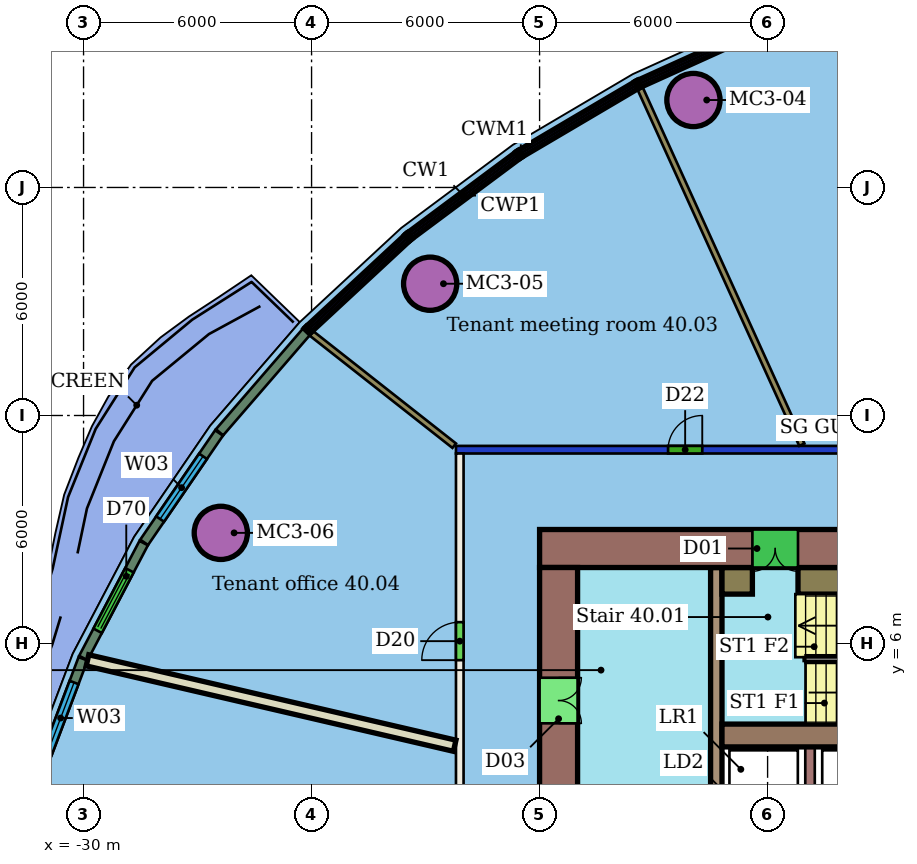
"""IFC4 building model, lengths in metres.
Left out: names, types, materials, properties, quantities, classifications, styles, units other than length and angle.
Written with IfcOpenShell. Run it as: python <this file> out.ifc"""

import sys

from ifc_helpers import new_model, si_unit, direction, frame, frame_2d, origin, origin_2d, place, context, subcontext, project, spatial, rectangle, hollow_circle, extrude, element, fill, save


model = new_model("IFC4")
c1 = context("Model", 3, precision=1e-05, world=origin(), true_north=direction((0.0, 1.0)))
c2 = subcontext(c1, "Body", "Model", "MODEL_VIEW")
j1 = project(units=[si_unit("LENGTHUNIT", "METRE"), si_unit("PLANEANGLEUNIT", "RADIAN")], contexts=[c1])
p1 = place(None, origin())
s1 = spatial("IfcSite", under=j1, at=p1, CompositionType="ELEMENT")
p2 = place(p1, origin())
s2 = spatial("IfcBuilding", under=s1, at=p2, CompositionType="ELEMENT")
p3 = place(p2, frame((0.0, 0.0, 168.6)))
s3 = spatial("IfcBuildingStorey", under=s2, at=p3, CompositionType="ELEMENT", Elevation=168.6)
for number, where, z_axis, x_axis in (
    (1, (-13.952, 20.301, 0.0), (0.0, 0.0, 1.0), (1.0, 0.0, 0.0)),
    (2, (-20.879, 15.467, 0.0), (0.0, 0.0, 1.0), (1.0, 0.0, 0.0)),
    (3, (-26.388, 8.912, 0.0), (0.0, 0.0, 1.0), (1.0, 0.0, 0.0)),
):
    element("IfcColumn", number, at=place(p3, frame(where, z_axis=z_axis, x_axis=x_axis)), inside=s3, PredefinedType="COLUMN", context=c2, shape_type="SweptSolid", body=[
        extrude(hollow_circle(Radius=0.7, WallThickness=0.05, at=origin_2d()), origin(), (0.0, 0.0, 1.0), 3.45),
    ])
p4 = place(p3, frame((-20.1, -11.0, 0.0), z_axis=(0.0, 0.0, 1.0), x_axis=(0.0, 1.0, 0.0)))
e4 = element("IfcWall", 4, at=p4, inside=s3, PredefinedType="PARTITIONING", context=c2, shape_type="SweptSolid", body=[
    extrude(rectangle(XDim=22.0, YDim=0.2, at=frame_2d((11.0, 0.0))), origin(), (0.0, 0.0, 1.0), 3.45),
])
p5 = place(p4, frame((16.562, 0.0, 0.0)))
e5 = element("IfcOpeningElement", 5, at=p5, cuts=e4, PredefinedType="OPENING", context=c2, shape_type="SweptSolid", body=[
    extrude(rectangle(XDim=1.0, YDim=2.1, at=frame_2d((0.5, 1.05))), frame((0.0, 0.11, 0.0), z_axis=(0.0, -1.0, 0.0), x_axis=(1.0, 0.0, 0.0)), (0.0, 0.0, 1.0), 0.22),
])
p6 = place(p4, frame((11.71, 0.0, 0.0)))
e6 = element("IfcOpeningElement", 6, at=p6, cuts=e4, PredefinedType="OPENING", context=c2, shape_type="SweptSolid", body=[
    extrude(rectangle(XDim=1.1, YDim=2.1, at=frame_2d((0.55, 1.05))), frame((0.0, 0.11, 0.0), z_axis=(0.0, -1.0, 0.0), x_axis=(1.0, 0.0, 0.0)), (0.0, 0.0, 1.0), 0.22),
])
p7 = place(p4, frame((6.269, 0.0, 0.0)))
e7 = element("IfcOpeningElement", 7, at=p7, cuts=e4, PredefinedType="OPENING", context=c2, shape_type="SweptSolid", body=[
    extrude(rectangle(XDim=1.2, YDim=2.1, at=frame_2d((0.6, 1.05))), frame((0.0, 0.11, 0.0), z_axis=(0.0, -1.0, 0.0), x_axis=(1.0, 0.0, 0.0)), (0.0, 0.0, 1.0), 0.22),
])
p8 = place(p3, frame((-20.2, 11.1, 0.0), z_axis=(0.0, 0.0, 1.0), x_axis=(1.0, 0.0, 0.0)))
e8 = element("IfcWall", 8, at=p8, inside=s3, PredefinedType="PARTITIONING", context=c2, shape_type="SweptSolid", body=[
    extrude(rectangle(XDim=28.4, YDim=0.2, at=frame_2d((14.2, 0.0))), origin(), (0.0, 0.0, 1.0), 3.05),
])
p9 = place(p8, frame((23.115, 0.0, 0.0)))
e9 = element("IfcOpeningElement", 9, at=p9, cuts=e8, PredefinedType="OPENING", context=c2, shape_type="SweptSolid", body=[
    extrude(rectangle(XDim=1.0, YDim=2.1, at=frame_2d((0.5, 1.05))), frame((0.0, 0.11, 0.0), z_axis=(0.0, -1.0, 0.0), x_axis=(1.0, 0.0, 0.0)), (0.0, 0.0, 1.0), 0.22),
])
p10 = place(p8, frame((16.0, 0.0, 0.0)))
e10 = element("IfcOpeningElement", 10, at=p10, cuts=e8, PredefinedType="OPENING", context=c2, shape_type="SweptSolid", body=[
    extrude(rectangle(XDim=1.8, YDim=2.1, at=frame_2d((0.9, 1.05))), frame((0.0, 0.11, 0.0), z_axis=(0.0, -1.0, 0.0), x_axis=(1.0, 0.0, 0.0)), (0.0, 0.0, 1.0), 0.22),
])
p11 = place(p8, frame((5.581, 0.0, 0.0)))
e11 = element("IfcOpeningElement", 11, at=p11, cuts=e8, PredefinedType="OPENING", context=c2, shape_type="SweptSolid", body=[
    extrude(rectangle(XDim=0.9, YDim=2.1, at=frame_2d((0.45, 1.05))), frame((0.0, 0.11, 0.0), z_axis=(0.0, -1.0, 0.0), x_axis=(1.0, 0.0, 0.0)), (0.0, 0.0, 1.0), 0.22),
])
p12 = place(p3, frame((-15.354, 20.604, 0.0), z_axis=(0.0, 0.0, 1.0), x_axis=(0.413381174211, -0.910558073276, 0.0)))
e12 = element("IfcWall", 12, at=p12, inside=s3, PredefinedType="PARTITIONING", context=c2, shape_type="SweptSolid", body=[
    extrude(rectangle(XDim=10.293, YDim=0.15, at=frame_2d((5.147, 0.0))), origin(), (0.0, 0.0, 1.0), 3.45),
])
p13 = place(p3, frame((-24.005, 14.162, 0.0), z_axis=(0.0, 0.0, 1.0), x_axis=(0.786002862243, -0.6182228567, 0.0)))
e13 = element("IfcWall", 13, at=p13, inside=s3, PredefinedType="PARTITIONING", context=c2, shape_type="SweptSolid", body=[
    extrude(rectangle(XDim=4.781, YDim=0.15, at=frame_2d((2.391, 0.0))), origin(), (0.0, 0.0, 1.0), 3.45),
])
p14 = place(p3, frame((-29.896, 5.558, 0.0), z_axis=(0.0, 0.0, 1.0), x_axis=(0.974001081483, -0.226543358476, 0.0)))
e14 = element("IfcWall", 14, at=p14, inside=s3, PredefinedType="PARTITIONING", context=c2, shape_type="SweptSolid", body=[
    extrude(rectangle(XDim=9.92, YDim=0.3, at=frame_2d((4.96, 0.0))), origin(), (0.0, 0.0, 1.0), 3.45),
])
p15 = place(p3, frame((-24.131, 14.207, 0.0), z_axis=(0.0, 0.0, 1.0), x_axis=(-0.654160555631, -0.756355714897, 0.0)))
e15 = element("IfcWall", 15, at=p15, inside=s3, PredefinedType="SOLIDWALL", context=c2, shape_type="SweptSolid", body=[
    extrude(rectangle(XDim=3.502, YDim=0.25, at=frame_2d((1.751, 0.0))), origin(), (0.0, 0.0, 1.0), 3.1),
])
p16 = place(p3, frame((-26.435, 11.54, 0.0), z_axis=(0.0, 0.0, 1.0), x_axis=(-0.564914738845, -0.825149282152, 0.0)))
e16 = element("IfcWall", 16, at=p16, inside=s3, PredefinedType="SOLIDWALL", context=c2, shape_type="SweptSolid", body=[
    extrude(rectangle(XDim=3.488, YDim=0.25, at=frame_2d((1.744, 0.0))), origin(), (0.0, 0.0, 1.0), 3.1),
])
p17 = place(p16, frame((0.744, 0.0, 0.9)))
e17 = element("IfcOpeningElement", 17, at=p17, cuts=e16, PredefinedType="OPENING", context=c2, shape_type="SweptSolid", body=[
    extrude(rectangle(XDim=2.0, YDim=2.1, at=frame_2d((1.0, 1.05))), frame((0.0, 0.135, 0.0), z_axis=(0.0, -1.0, 0.0), x_axis=(1.0, 0.0, 0.0)), (0.0, 0.0, 1.0), 0.27),
])
p18 = place(p3, frame((-28.417, 8.643, 0.0), z_axis=(0.0, 0.0, 1.0), x_axis=(-0.464826893602, -0.885401580631, 0.0)))
e18 = element("IfcWall", 18, at=p18, inside=s3, PredefinedType="SOLIDWALL", context=c2, shape_type="SweptSolid", body=[
    extrude(rectangle(XDim=3.415, YDim=0.25, at=frame_2d((1.708, 0.0))), origin(), (0.0, 0.0, 1.0), 3.1),
])
p19 = place(p18, frame((0.807, 0.0, 0.0)))
e19 = element("IfcOpeningElement", 19, at=p19, cuts=e18, PredefinedType="OPENING", context=c2, shape_type="SweptSolid", body=[
    extrude(rectangle(XDim=1.8, YDim=2.4, at=frame_2d((0.9, 1.2))), frame((0.0, 0.135, 0.0), z_axis=(0.0, -1.0, 0.0), x_axis=(1.0, 0.0, 0.0)), (0.0, 0.0, 1.0), 0.27),
])
p20 = place(p3, frame((-30.014, 5.598, 0.0), z_axis=(0.0, 0.0, 1.0), x_axis=(-0.353443321973, -0.935455941321, 0.0)))
e20 = element("IfcWall", 20, at=p20, inside=s3, PredefinedType="SOLIDWALL", context=c2, shape_type="SweptSolid", body=[
    extrude(rectangle(XDim=3.332, YDim=0.25, at=frame_2d((1.666, 0.0))), origin(), (0.0, 0.0, 1.0), 3.1),
])
p21 = place(p20, frame((0.666, 0.0, 0.9)))
e21 = element("IfcOpeningElement", 21, at=p21, cuts=e20, PredefinedType="OPENING", context=c2, shape_type="SweptSolid", body=[
    extrude(rectangle(XDim=2.0, YDim=2.1, at=frame_2d((1.0, 1.05))), frame((0.0, 0.135, 0.0), z_axis=(0.0, -1.0, 0.0), x_axis=(1.0, 0.0, 0.0)), (0.0, 0.0, 1.0), 0.27),
])
p22 = place(p3, frame((-6.0, 8.5, 0.0), z_axis=(0.0, 0.0, 1.0), x_axis=(-1.0, 0.0, 0.0)))
e22 = element("IfcWall", 22, at=p22, inside=s3, PredefinedType="SHEAR", context=c2, shape_type="SweptSolid", body=[
    extrude(rectangle(XDim=12.0, YDim=1.0, at=frame_2d((6.0, 0.0))), origin(), (0.0, 0.0, 1.0), 3.3),
])
p23 = place(p22, frame((5.2, 0.0, 0.0)))
e23 = element("IfcOpeningElement", 23, at=p23, cuts=e22, PredefinedType="OPENING", context=c2, shape_type="SweptSolid", body=[
    extrude(rectangle(XDim=1.2, YDim=2.1, at=frame_2d((0.6, 1.05))), frame((0.0, 0.51, 0.0), z_axis=(0.0, -1.0, 0.0), x_axis=(1.0, 0.0, 0.0)), (0.0, 0.0, 1.0), 1.02),
])
p24 = place(p3, frame((-17.5, 8.0, 0.0), z_axis=(0.0, 0.0, 1.0), x_axis=(0.0, -1.0, 0.0)))
e24 = element("IfcWall", 24, at=p24, inside=s3, PredefinedType="SHEAR", context=c2, shape_type="SweptSolid", body=[
    extrude(rectangle(XDim=16.0, YDim=1.0, at=frame_2d((8.0, 0.0))), origin(), (0.0, 0.0, 1.0), 3.3),
])
p25 = place(p24, frame((11.9, 0.0, 0.0)))
e25 = element("IfcOpeningElement", 25, at=p25, cuts=e24, PredefinedType="OPENING", context=c2, shape_type="SweptSolid", body=[
    extrude(rectangle(XDim=1.2, YDim=2.1, at=frame_2d((0.6, 1.05))), frame((0.0, 0.51, 0.0), z_axis=(0.0, -1.0, 0.0), x_axis=(1.0, 0.0, 0.0)), (0.0, 0.0, 1.0), 1.02),
])
p26 = place(p24, frame((2.9, 0.0, 0.0)))
e26 = element("IfcOpeningElement", 26, at=p26, cuts=e24, PredefinedType="OPENING", context=c2, shape_type="SweptSolid", body=[
    extrude(rectangle(XDim=1.2, YDim=2.1, at=frame_2d((0.6, 1.05))), frame((0.0, 0.51, 0.0), z_axis=(0.0, -1.0, 0.0), x_axis=(1.0, 0.0, 0.0)), (0.0, 0.0, 1.0), 1.02),
])
p27 = place(p3, frame((-13.2, 3.58, 0.0), z_axis=(0.0, 0.0, 1.0), x_axis=(1.0, 0.0, 0.0)))
e27 = element("IfcWall", 27, at=p27, inside=s3, PredefinedType="SHEAR", context=c2, shape_type="SweptSolid", body=[
    extrude(rectangle(XDim=7.2, YDim=0.6, at=frame_2d((3.6, 0.0))), origin(), (0.0, 0.0, 1.0), 3.3),
])
p28 = place(p3, frame((-13.35, 8.0, 0.0), z_axis=(0.0, 0.0, 1.0), x_axis=(0.0, -1.0, 0.0)))
e28 = element("IfcWall", 28, at=p28, inside=s3, PredefinedType="SHEAR", context=c2, shape_type="SweptSolid", body=[
    extrude(rectangle(XDim=16.0, YDim=0.3, at=frame_2d((8.0, 0.0))), origin(), (0.0, 0.0, 1.0), 3.3),
])
p29 = place(p28, frame((7.25, 0.0, 0.0)))
e29 = element("IfcOpeningElement", 29, at=p29, cuts=e28, PredefinedType="OPENING", context=c2, shape_type="SweptSolid", body=[
    extrude(rectangle(XDim=1.5, YDim=2.1, at=frame_2d((0.75, 1.05))), frame((0.0, 0.16, 0.0), z_axis=(0.0, -1.0, 0.0), x_axis=(1.0, 0.0, 0.0)), (0.0, 0.0, 1.0), 0.32),
])
p30 = place(p3, frame((-13.2, 7.65, 0.0), z_axis=(0.0, 0.0, 1.0), x_axis=(1.0, 0.0, 0.0)))
e30 = element("IfcWall", 30, at=p30, inside=s3, PredefinedType="SHEAR", context=c2, shape_type="SweptSolid", body=[
    extrude(rectangle(XDim=0.8, YDim=0.7, at=frame_2d((0.4, 0.0))), origin(), (0.0, 0.0, 1.0), 3.3),
])
p31 = place(p3, frame((-11.2, 7.65, 0.0), z_axis=(0.0, 0.0, 1.0), x_axis=(1.0, 0.0, 0.0)))
e31 = element("IfcWall", 31, at=p31, inside=s3, PredefinedType="SHEAR", context=c2, shape_type="SweptSolid", body=[
    extrude(rectangle(XDim=5.05, YDim=0.7, at=frame_2d((2.525, 0.0))), origin(), (0.0, 0.0, 1.0), 3.3),
])
p32 = place(p3, frame((-10.883, 1.6, 0.0), z_axis=(0.0, 0.0, 1.0), x_axis=(0.0, 1.0, 0.0)))
e32 = element("IfcWall", 32, at=p32, inside=s3, PredefinedType="SHEAR", context=c2, shape_type="SweptSolid", body=[
    extrude(rectangle(XDim=1.68, YDim=0.25, at=frame_2d((0.84, 0.0))), origin(), (0.0, 0.0, 1.0), 3.3),
])
p33 = place(p11, origin())
e33 = element("IfcDoor", 33, at=p33, inside=s3, OperationType="SINGLE_SWING_RIGHT", PredefinedType="DOOR", context=c2, shape_type="SweptSolid", body=[
    extrude(rectangle(XDim=0.9, YDim=2.1, at=frame_2d((0.45, 1.05))), frame((0.0, 0.025, 0.0), z_axis=(0.0, -1.0, 0.0), x_axis=(1.0, 0.0, 0.0)), (0.0, 0.0, 1.0), 0.05),
])
fill(e11, e33)
p34 = place(p5, origin())
e34 = element("IfcDoor", 34, at=p34, inside=s3, OperationType="SINGLE_SWING_LEFT", PredefinedType="DOOR", context=c2, shape_type="SweptSolid", body=[
    extrude(rectangle(XDim=1.0, YDim=2.1, at=frame_2d((0.5, 1.05))), frame((0.0, 0.025, 0.0), z_axis=(0.0, -1.0, 0.0), x_axis=(1.0, 0.0, 0.0)), (0.0, 0.0, 1.0), 0.05),
])
fill(e5, e34)
p35 = place(p17, origin())
e35 = element("IfcWindow", 35, at=p35, inside=s3, PartitioningType="SINGLE_PANEL", PredefinedType="WINDOW", context=c2, shape_type="SweptSolid", body=[
    extrude(rectangle(XDim=2.0, YDim=2.1, at=frame_2d((1.0, 1.05))), frame((0.0, 0.03, 0.0), z_axis=(0.0, -1.0, 0.0), x_axis=(1.0, 0.0, 0.0)), (0.0, 0.0, 1.0), 0.06),
])
fill(e17, e35)
p36 = place(p19, origin())
e36 = element("IfcDoor", 36, at=p36, inside=s3, OperationType="DOUBLE_DOOR_SLIDING", PredefinedType="DOOR", context=c2, shape_type="SweptSolid", body=[
    extrude(rectangle(XDim=1.8, YDim=2.4, at=frame_2d((0.9, 1.2))), frame((0.0, 0.025, 0.0), z_axis=(0.0, -1.0, 0.0), x_axis=(1.0, 0.0, 0.0)), (0.0, 0.0, 1.0), 0.05),
])
fill(e19, e36)
p37 = place(p21, origin())
e37 = element("IfcWindow", 37, at=p37, inside=s3, PartitioningType="SINGLE_PANEL", PredefinedType="WINDOW", context=c2, shape_type="SweptSolid", body=[
    extrude(rectangle(XDim=2.0, YDim=2.1, at=frame_2d((1.0, 1.05))), frame((0.0, 0.03, 0.0), z_axis=(0.0, -1.0, 0.0), x_axis=(1.0, 0.0, 0.0)), (0.0, 0.0, 1.0), 0.06),
])
fill(e21, e37)
p38 = place(p23, origin())
e38 = element("IfcDoor", 38, at=p38, inside=s3, OperationType="DOUBLE_DOOR_SINGLE_SWING", PredefinedType="NOTDEFINED", context=c2, shape_type="SweptSolid", body=[
    extrude(rectangle(XDim=1.2, YDim=2.1, at=frame_2d((0.6, 1.05))), frame((0.0, 0.025, 0.0), z_axis=(0.0, -1.0, 0.0), x_axis=(1.0, 0.0, 0.0)), (0.0, 0.0, 1.0), 0.05),
])
fill(e23, e38)
p39 = place(p26, origin())
e39 = element("IfcDoor", 39, at=p39, inside=s3, OperationType="DOUBLE_DOOR_SINGLE_SWING", PredefinedType="NOTDEFINED", context=c2, shape_type="SweptSolid", body=[
    extrude(rectangle(XDim=1.2, YDim=2.1, at=frame_2d((0.6, 1.05))), frame((0.0, 0.025, 0.0), z_axis=(0.0, -1.0, 0.0), x_axis=(1.0, 0.0, 0.0)), (0.0, 0.0, 1.0), 0.05),
])
fill(e26, e39)
save(model, sys.argv[1])
